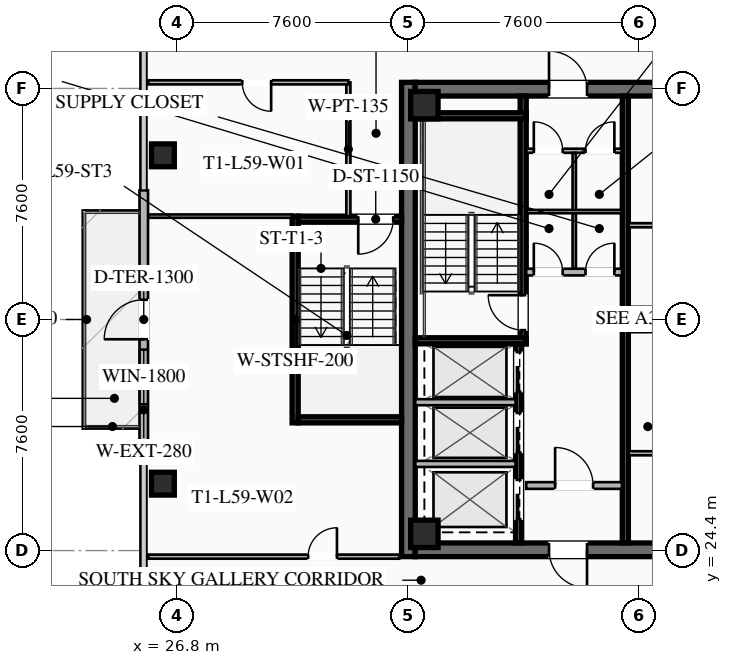
"""IFC4 building model, lengths in metres.
Left out: names, types, materials, properties, quantities, classifications, styles, units other than length and angle.
Written with IfcOpenShell. Run it as: python <this file> out.ifc"""

import sys

from ifc_helpers import new_model, si_unit, direction, frame, frame_2d, origin, origin_2d, place, context, subcontext, project, spatial, rectangle, hollow_rectangle, extrude, element, fill, save


model = new_model("IFC4")
c1 = context("Model", 3, precision=1e-05, world=origin(), true_north=direction((0.0, 1.0)))
c2 = subcontext(c1, "Body", "Model", "MODEL_VIEW")
j1 = project(units=[si_unit("LENGTHUNIT", "METRE"), si_unit("PLANEANGLEUNIT", "RADIAN")], contexts=[c1])
p1 = place(None, origin())
s1 = spatial("IfcSite", under=j1, at=p1, CompositionType="ELEMENT")
p2 = place(p1, origin())
s2 = spatial("IfcBuilding", under=s1, at=p2, CompositionType="ELEMENT")
p3 = place(p2, frame((0.0, 0.0, 218.4)))
s3 = spatial("IfcBuildingStorey", under=s2, at=p3, CompositionType="ELEMENT", Elevation=218.4)
p4 = place(p3, frame((34.425, 24.2, 0.0), z_axis=(0.0, 0.0, 1.0), x_axis=(0.0, 1.0, 0.0)))
e1 = element("IfcWall", 1, at=p4, inside=s3, PredefinedType="SHEAR", context=c2, shape_type="SweptSolid", body=[
    extrude(rectangle(XDim=15.6, YDim=0.45, at=frame_2d((7.8, 0.0))), origin(), (0.0, 0.0, 1.0), 3.55),
])
p5 = place(p3, frame((49.35, 24.425, 0.0), z_axis=(0.0, 0.0, 1.0), x_axis=(-1.0, 0.0, 0.0)))
e2 = element("IfcWall", 2, at=p5, inside=s3, PredefinedType="SHEAR", context=c2, shape_type="SweptSolid", body=[
    extrude(rectangle(XDim=14.7, YDim=0.45, at=frame_2d((7.35, 0.0))), origin(), (0.0, 0.0, 1.0), 3.55),
])
p6 = place(p5, frame((9.05, 0.0, 0.0)))
e3 = element("IfcOpeningElement", 3, at=p6, cuts=e2, PredefinedType="OPENING", context=c2, shape_type="SweptSolid", body=[
    extrude(rectangle(XDim=1.25, YDim=2.25, at=frame_2d((0.625, 1.125))), frame((0.0, 0.235, 0.0), z_axis=(0.0, -1.0, 0.0), x_axis=(1.0, 0.0, 0.0)), (0.0, 0.0, 1.0), 0.47),
])
p7 = place(p5, frame((4.0, 0.0, 0.0)))
e4 = element("IfcOpeningElement", 4, at=p7, cuts=e2, PredefinedType="OPENING", context=c2, shape_type="SweptSolid", body=[
    extrude(rectangle(XDim=1.25, YDim=2.25, at=frame_2d((0.625, 1.125))), frame((0.0, 0.235, 0.0), z_axis=(0.0, -1.0, 0.0), x_axis=(1.0, 0.0, 0.0)), (0.0, 0.0, 1.0), 0.47),
])
p8 = place(p3, frame((34.65, 39.575, 0.0), z_axis=(0.0, 0.0, 1.0), x_axis=(1.0, 0.0, 0.0)))
e5 = element("IfcWall", 5, at=p8, inside=s3, PredefinedType="SHEAR", context=c2, shape_type="SweptSolid", body=[
    extrude(rectangle(XDim=14.7, YDim=0.45, at=frame_2d((7.35, 0.0))), origin(), (0.0, 0.0, 1.0), 3.55),
])
p9 = place(p8, frame((4.4, 0.0, 0.0)))
e6 = element("IfcOpeningElement", 6, at=p9, cuts=e5, PredefinedType="OPENING", context=c2, shape_type="SweptSolid", body=[
    extrude(rectangle(XDim=1.25, YDim=2.25, at=frame_2d((0.625, 1.125))), frame((0.0, 0.235, 0.0), z_axis=(0.0, -1.0, 0.0), x_axis=(1.0, 0.0, 0.0)), (0.0, 0.0, 1.0), 0.47),
])
p10 = place(p8, frame((9.45, 0.0, 0.0)))
e7 = element("IfcOpeningElement", 7, at=p10, cuts=e5, PredefinedType="OPENING", context=c2, shape_type="SweptSolid", body=[
    extrude(rectangle(XDim=1.25, YDim=2.25, at=frame_2d((0.625, 1.125))), frame((0.0, 0.235, 0.0), z_axis=(0.0, -1.0, 0.0), x_axis=(1.0, 0.0, 0.0)), (0.0, 0.0, 1.0), 0.47),
])
for number, where, z_axis, x_axis in (
    (8, (34.95, 24.95, 0.0), (0.0, 0.0, 1.0), (1.0, 0.0, 0.0)),
    (9, (34.95, 39.05, 0.0), (0.0, 0.0, 1.0), (1.0, 0.0, 0.0)),
):
    element("IfcColumn", number, at=place(p3, frame(where, z_axis=z_axis, x_axis=x_axis)), inside=s3, PredefinedType="COLUMN", context=c2, shape_type="SweptSolid", body=[
        extrude(hollow_rectangle(XDim=0.9, YDim=0.9, WallThickness=0.04, at=origin_2d()), origin(), (0.0, 0.0, 1.0), 3.37),
    ])
for number, where, z_axis, x_axis in (
    (10, (26.35, 37.4, 0.0), (0.0, 0.0, 1.0), (1.0, 0.0, 0.0)),
    (11, (26.35, 26.6, 0.0), (0.0, 0.0, 1.0), (1.0, 0.0, 0.0)),
):
    element("IfcColumn", number, at=place(p3, frame(where, z_axis=z_axis, x_axis=x_axis)), inside=s3, PredefinedType="COLUMN", context=c2, shape_type="SweptSolid", body=[
        extrude(hollow_rectangle(XDim=0.75, YDim=0.75, WallThickness=0.032, at=origin_2d()), origin(), (0.0, 0.0, 1.0), 3.37),
    ])
p11 = place(p3, frame((25.72, 27.75, 0.0), z_axis=(0.0, 0.0, 1.0), x_axis=(0.0, 1.0, 0.0)))
e12 = element("IfcWall", 12, at=p11, inside=s3, PredefinedType="SOLIDWALL", context=c2, shape_type="SweptSolid", body=[
    extrude(rectangle(XDim=8.5, YDim=0.28, at=frame_2d((4.25, 0.0))), origin(), (0.0, 0.0, 1.0), 3.37),
])
p12 = place(p11, frame((3.6, 0.0, 0.0)))
e13 = element("IfcOpeningElement", 13, at=p12, cuts=e12, PredefinedType="OPENING", context=c2, shape_type="SweptSolid", body=[
    extrude(rectangle(XDim=1.3, YDim=2.15, at=frame_2d((0.65, 1.075))), frame((0.0, 0.15, 0.0), z_axis=(0.0, -1.0, 0.0), x_axis=(1.0, 0.0, 0.0)), (0.0, 0.0, 1.0), 0.3),
])
p13 = place(p11, frame((1.46, 0.0, 0.85)))
e14 = element("IfcOpeningElement", 14, at=p13, cuts=e12, PredefinedType="OPENING", context=c2, shape_type="SweptSolid", body=[
    extrude(rectangle(XDim=1.8, YDim=1.92, at=frame_2d((0.9, 0.96))), frame((0.0, 0.15, 0.0), z_axis=(0.0, -1.0, 0.0), x_axis=(1.0, 0.0, 0.0)), (0.0, 0.0, 1.0), 0.3),
])
p14 = place(p3, frame((38.2, 31.2, 0.0), z_axis=(0.0, 0.0, 1.0), x_axis=(0.0, 1.0, 0.0)))
e15 = element("IfcWall", 15, at=p14, inside=s3, PredefinedType="SHEAR", context=c2, shape_type="SweptSolid", body=[
    extrude(rectangle(XDim=8.15, YDim=0.2, at=frame_2d((4.075, 0.0))), origin(), (0.0, 0.0, 1.0), 3.37),
])
p15 = place(p14, frame((0.45, 0.0, 0.0)))
e16 = element("IfcOpeningElement", 16, at=p15, cuts=e15, PredefinedType="OPENING", context=c2, shape_type="SweptSolid", body=[
    extrude(rectangle(XDim=1.15, YDim=2.2, at=frame_2d((0.575, 1.1))), frame((0.0, 0.11, 0.0), z_axis=(0.0, -1.0, 0.0), x_axis=(1.0, 0.0, 0.0)), (0.0, 0.0, 1.0), 0.22),
])
for number, where, z_axis, x_axis in (
    (17, (34.65, 31.3, 0.0), (0.0, 0.0, 1.0), (1.0, 0.0, 0.0)),
    (18, (34.65, 38.7, 0.0), (0.0, 0.0, 1.0), (1.0, 0.0, 0.0)),
):
    element("IfcWall", number, at=place(p3, frame(where, z_axis=z_axis, x_axis=x_axis)), inside=s3, PredefinedType="SHEAR", context=c2, shape_type="SweptSolid", body=[
        extrude(rectangle(XDim=3.65, YDim=0.2, at=frame_2d((1.825, 0.0))), origin(), (0.0, 0.0, 1.0), 3.37),
    ])
p16 = place(p3, frame((41.56, 24.65, 0.0), z_axis=(0.0, 0.0, 1.0), x_axis=(0.0, 1.0, 0.0)))
e19 = element("IfcWall", 19, at=p16, inside=s3, PredefinedType="SHEAR", context=c2, shape_type="SweptSolid", body=[
    extrude(rectangle(XDim=14.7, YDim=0.2, at=frame_2d((7.35, 0.0))), origin(), (0.0, 0.0, 1.0), 3.37),
])
p17 = place(p3, frame((38.3, 33.56, 0.0), z_axis=(0.0, 0.0, 1.0), x_axis=(1.0, 0.0, 0.0)))
e20 = element("IfcWall", 20, at=p17, inside=s3, PredefinedType="SOLIDWALL", context=c2, shape_type="SweptSolid", body=[
    extrude(rectangle(XDim=3.15, YDim=0.22, at=frame_2d((1.575, 0.0))), origin(), (0.0, 0.0, 1.0), 2.723),
])
p18 = place(p17, frame((0.25, 0.0, 0.0)))
e21 = element("IfcOpeningElement", 21, at=p18, cuts=e20, PredefinedType="OPENING", context=c2, shape_type="SweptSolid", body=[
    extrude(rectangle(XDim=0.95, YDim=2.05, at=frame_2d((0.475, 1.025))), frame((0.0, 0.12, 0.0), z_axis=(0.0, -1.0, 0.0), x_axis=(1.0, 0.0, 0.0)), (0.0, 0.0, 1.0), 0.24),
])
p19 = place(p17, frame((1.95, 0.0, 0.0)))
e22 = element("IfcOpeningElement", 22, at=p19, cuts=e20, PredefinedType="OPENING", context=c2, shape_type="SweptSolid", body=[
    extrude(rectangle(XDim=0.95, YDim=2.05, at=frame_2d((0.475, 1.025))), frame((0.0, 0.12, 0.0), z_axis=(0.0, -1.0, 0.0), x_axis=(1.0, 0.0, 0.0)), (0.0, 0.0, 1.0), 0.24),
])
p20 = place(p3, frame((38.3, 26.54, 0.0), z_axis=(0.0, 0.0, 1.0), x_axis=(1.0, 0.0, 0.0)))
e23 = element("IfcWall", 23, at=p20, inside=s3, PredefinedType="SOLIDWALL", context=c2, shape_type="SweptSolid", body=[
    extrude(rectangle(XDim=3.15, YDim=0.22, at=frame_2d((1.575, 0.0))), origin(), (0.0, 0.0, 1.0), 2.723),
])
p21 = place(p20, frame((0.95, 0.0, 0.0)))
e24 = element("IfcOpeningElement", 24, at=p21, cuts=e23, PredefinedType="OPENING", context=c2, shape_type="SweptSolid", body=[
    extrude(rectangle(XDim=1.25, YDim=2.25, at=frame_2d((0.625, 1.125))), frame((0.0, 0.12, 0.0), z_axis=(0.0, -1.0, 0.0), x_axis=(1.0, 0.0, 0.0)), (0.0, 0.0, 1.0), 0.24),
])
p22 = place(p3, frame((38.05, 24.65, 0.0), z_axis=(0.0, 0.0, 1.0), x_axis=(0.0, 1.0, 0.0)))
e25 = element("IfcWall", 25, at=p22, inside=s3, PredefinedType="SHEAR", context=c2, shape_type="SweptSolid", body=[
    extrude(rectangle(XDim=6.55, YDim=0.2, at=frame_2d((3.275, 0.0))), origin(), (0.0, 0.0, 1.0), 3.37),
])
p23 = place(p22, frame((4.975, 0.0, 0.0)))
e26 = element("IfcOpeningElement", 26, at=p23, cuts=e25, PredefinedType="OPENING", context=c2, shape_type="SweptSolid", body=[
    extrude(rectangle(XDim=1.3, YDim=2.25, at=frame_2d((0.65, 1.125))), frame((0.0, 0.11, 0.0), z_axis=(0.0, -1.0, 0.0), x_axis=(1.0, 0.0, 0.0)), (0.0, 0.0, 1.0), 0.22),
])
p24 = place(p22, frame((2.975, 0.0, 0.0)))
e27 = element("IfcOpeningElement", 27, at=p24, cuts=e25, PredefinedType="OPENING", context=c2, shape_type="SweptSolid", body=[
    extrude(rectangle(XDim=1.3, YDim=2.25, at=frame_2d((0.65, 1.125))), frame((0.0, 0.11, 0.0), z_axis=(0.0, -1.0, 0.0), x_axis=(1.0, 0.0, 0.0)), (0.0, 0.0, 1.0), 0.22),
])
p25 = place(p22, frame((0.775, 0.0, 0.0)))
e28 = element("IfcOpeningElement", 28, at=p25, cuts=e25, PredefinedType="OPENING", context=c2, shape_type="SweptSolid", body=[
    extrude(rectangle(XDim=1.3, YDim=2.25, at=frame_2d((0.65, 1.125))), frame((0.0, 0.11, 0.0), z_axis=(0.0, -1.0, 0.0), x_axis=(1.0, 0.0, 0.0)), (0.0, 0.0, 1.0), 0.22),
])
for number, where, z_axis, x_axis in (
    (29, (34.65, 27.25, 0.0), (0.0, 0.0, 1.0), (1.0, 0.0, 0.0)),
    (30, (34.65, 29.28, 0.0), (0.0, 0.0, 1.0), (1.0, 0.0, 0.0)),
):
    element("IfcWall", number, at=place(p3, frame(where, z_axis=z_axis, x_axis=x_axis)), inside=s3, PredefinedType="SOLIDWALL", context=c2, shape_type="SweptSolid", body=[
        extrude(rectangle(XDim=3.3, YDim=0.2, at=frame_2d((1.65, 0.0))), origin(), (0.0, 0.0, 1.0), 3.37),
    ])
p26 = place(p3, frame((38.3, 37.55, 0.0), z_axis=(0.0, 0.0, 1.0), x_axis=(1.0, 0.0, 0.0)))
e31 = element("IfcWall", 31, at=p26, inside=s3, PredefinedType="PARTITIONING", context=c2, shape_type="SweptSolid", body=[
    extrude(rectangle(XDim=3.15, YDim=0.135, at=frame_2d((1.575, 0.0))), origin(), (0.0, 0.0, 1.0), 2.723),
])
p27 = place(p26, frame((0.25, 0.0, 0.0)))
e32 = element("IfcOpeningElement", 32, at=p27, cuts=e31, PredefinedType="OPENING", context=c2, shape_type="SweptSolid", body=[
    extrude(rectangle(XDim=0.95, YDim=2.05, at=frame_2d((0.475, 1.025))), frame((0.0, 0.077, 0.0), z_axis=(0.0, -1.0, 0.0), x_axis=(1.0, 0.0, 0.0)), (0.0, 0.0, 1.0), 0.155),
])
p28 = place(p26, frame((1.95, 0.0, 0.0)))
e33 = element("IfcOpeningElement", 33, at=p28, cuts=e31, PredefinedType="OPENING", context=c2, shape_type="SweptSolid", body=[
    extrude(rectangle(XDim=0.95, YDim=2.05, at=frame_2d((0.475, 1.025))), frame((0.0, 0.077, 0.0), z_axis=(0.0, -1.0, 0.0), x_axis=(1.0, 0.0, 0.0)), (0.0, 0.0, 1.0), 0.155),
])
p29 = place(p3, frame((39.88, 33.68, 0.0), z_axis=(0.0, 0.0, 1.0), x_axis=(0.0, 1.0, 0.0)))
e34 = element("IfcWall", 34, at=p29, inside=s3, PredefinedType="PARTITIONING", context=c2, shape_type="SweptSolid", body=[
    extrude(rectangle(XDim=3.8, YDim=0.11, at=frame_2d((1.9, 0.0))), origin(), (0.0, 0.0, 1.0), 2.723),
])
p30 = place(p3, frame((38.3, 35.55, 0.0), z_axis=(0.0, 0.0, 1.0), x_axis=(1.0, 0.0, 0.0)))
e35 = element("IfcWall", 35, at=p30, inside=s3, PredefinedType="PARTITIONING", context=c2, shape_type="SweptSolid", body=[
    extrude(rectangle(XDim=3.15, YDim=0.11, at=frame_2d((1.575, 0.0))), origin(), (0.0, 0.0, 1.0), 2.723),
])
for number, where, z_axis, x_axis in (
    (36, (41.67, 31.65, 0.0), (0.0, 0.0, 1.0), (1.0, 0.0, 0.0)),
    (37, (41.67, 27.6, 0.0), (0.0, 0.0, 1.0), (1.0, 0.0, 0.0)),
    (38, (41.67, 32.35, 0.0), (0.0, 0.0, 1.0), (1.0, 0.0, 0.0)),
    (39, (41.67, 35.1, 0.0), (0.0, 0.0, 1.0), (1.0, 0.0, 0.0)),
):
    element("IfcWall", number, at=place(p3, frame(where, z_axis=z_axis, x_axis=x_axis)), inside=s3, PredefinedType="PARTITIONING", context=c2, shape_type="SweptSolid", body=[
        extrude(rectangle(XDim=1.88, YDim=0.135, at=frame_2d((0.94, 0.0))), origin(), (0.0, 0.0, 1.0), 2.723),
    ])
p31 = place(p3, frame((30.7, 28.6, 0.0), z_axis=(0.0, 0.0, 1.0), x_axis=(0.0, 1.0, 0.0)))
e40 = element("IfcWall", 40, at=p31, inside=s3, PredefinedType="SHEAR", context=c2, shape_type="SweptSolid", body=[
    extrude(rectangle(XDim=6.8, YDim=0.2, at=frame_2d((3.4, 0.0))), origin(), (0.0, 0.0, 1.0), 3.37),
])
p32 = place(p3, frame((34.2, 35.3, 0.0), z_axis=(0.0, 0.0, 1.0), x_axis=(-1.0, 0.0, 0.0)))
e41 = element("IfcWall", 41, at=p32, inside=s3, PredefinedType="SHEAR", context=c2, shape_type="SweptSolid", body=[
    extrude(rectangle(XDim=3.4, YDim=0.2, at=frame_2d((1.7, 0.0))), origin(), (0.0, 0.0, 1.0), 3.37),
])
p33 = place(p32, frame((0.275, 0.0, 0.0)))
e42 = element("IfcOpeningElement", 42, at=p33, cuts=e41, PredefinedType="OPENING", context=c2, shape_type="SweptSolid", body=[
    extrude(rectangle(XDim=1.15, YDim=2.2, at=frame_2d((0.575, 1.1))), frame((0.0, 0.11, 0.0), z_axis=(0.0, -1.0, 0.0), x_axis=(1.0, 0.0, 0.0)), (0.0, 0.0, 1.0), 0.22),
])
p34 = place(p3, frame((30.8, 28.7, 0.0), z_axis=(0.0, 0.0, 1.0), x_axis=(1.0, 0.0, 0.0)))
e43 = element("IfcWall", 43, at=p34, inside=s3, PredefinedType="SHEAR", context=c2, shape_type="SweptSolid", body=[
    extrude(rectangle(XDim=3.4, YDim=0.2, at=frame_2d((1.7, 0.0))), origin(), (0.0, 0.0, 1.0), 3.37),
])
p35 = place(p3, frame((32.45, 35.4, 0.0), z_axis=(0.0, 0.0, 1.0), x_axis=(0.0, 1.0, 0.0)))
e44 = element("IfcWall", 44, at=p35, inside=s3, PredefinedType="PARTITIONING", context=c2, shape_type="SweptSolid", body=[
    extrude(rectangle(XDim=4.4, YDim=0.135, at=frame_2d((2.2, 0.0))), origin(), (0.0, 0.0, 1.0), 2.723),
])
p36 = place(p3, frame((32.45, 39.8, 0.0), z_axis=(0.0, 0.0, 1.0), x_axis=(-1.0, 0.0, 0.0)))
e45 = element("IfcWall", 45, at=p36, inside=s3, PredefinedType="PARTITIONING", context=c2, shape_type="SweptSolid", body=[
    extrude(rectangle(XDim=6.58, YDim=0.135, at=frame_2d((3.29, 0.0))), origin(), (0.0, 0.0, 1.0), 2.723),
])
p37 = place(p36, frame((2.54, 0.0, 0.0)))
e46 = element("IfcOpeningElement", 46, at=p37, cuts=e45, PredefinedType="OPENING", context=c2, shape_type="SweptSolid", body=[
    extrude(rectangle(XDim=0.95, YDim=2.05, at=frame_2d((0.475, 1.025))), frame((0.0, 0.077, 0.0), z_axis=(0.0, -1.0, 0.0), x_axis=(1.0, 0.0, 0.0)), (0.0, 0.0, 1.0), 0.155),
])
p38 = place(p3, frame((25.87, 24.2, 0.0), z_axis=(0.0, 0.0, 1.0), x_axis=(1.0, 0.0, 0.0)))
e47 = element("IfcWall", 47, at=p38, inside=s3, PredefinedType="PARTITIONING", context=c2, shape_type="SweptSolid", body=[
    extrude(rectangle(XDim=8.25, YDim=0.135, at=frame_2d((4.125, 0.0))), origin(), (0.0, 0.0, 1.0), 2.723),
])
p39 = place(p38, frame((5.255, 0.0, 0.0)))
e48 = element("IfcOpeningElement", 48, at=p39, cuts=e47, PredefinedType="OPENING", context=c2, shape_type="SweptSolid", body=[
    extrude(rectangle(XDim=0.95, YDim=2.05, at=frame_2d((0.475, 1.025))), frame((0.0, 0.077, 0.0), z_axis=(0.0, -1.0, 0.0), x_axis=(1.0, 0.0, 0.0)), (0.0, 0.0, 1.0), 0.155),
])
p40 = place(p3, frame((30.6, 35.4, 0.0), z_axis=(0.0, 0.0, 1.0), x_axis=(-1.0, 0.0, 0.0)))
e49 = element("IfcWall", 49, at=p40, inside=s3, PredefinedType="PARTITIONING", context=c2, shape_type="SweptSolid", body=[
    extrude(rectangle(XDim=4.73, YDim=0.11, at=frame_2d((2.365, 0.0))), origin(), (0.0, 0.0, 1.0), 2.723),
])
p41 = place(p12, origin())
e50 = element("IfcDoor", 50, at=p41, inside=s3, OperationType="SINGLE_SWING_LEFT", PredefinedType="DOOR", context=c2, shape_type="SweptSolid", body=[
    extrude(rectangle(XDim=1.3, YDim=2.15, at=frame_2d((0.65, 1.075))), frame((0.0, 0.025, 0.0), z_axis=(0.0, -1.0, 0.0), x_axis=(1.0, 0.0, 0.0)), (0.0, 0.0, 1.0), 0.05),
])
fill(e13, e50)
p42 = place(p13, origin())
e51 = element("IfcWindow", 51, at=p42, inside=s3, PartitioningType="SINGLE_PANEL", PredefinedType="WINDOW", context=c2, shape_type="SweptSolid", body=[
    extrude(rectangle(XDim=1.8, YDim=1.92, at=frame_2d((0.9, 0.96))), frame((0.0, 0.03, 0.0), z_axis=(0.0, -1.0, 0.0), x_axis=(1.0, 0.0, 0.0)), (0.0, 0.0, 1.0), 0.06),
])
fill(e14, e51)
p43 = place(p9, origin())
e52 = element("IfcDoor", 52, at=p43, inside=s3, OperationType="SINGLE_SWING_LEFT", PredefinedType="DOOR", context=c2, shape_type="SweptSolid", body=[
    extrude(rectangle(XDim=1.25, YDim=2.25, at=frame_2d((0.625, 1.125))), frame((0.0, 0.025, 0.0), z_axis=(0.0, -1.0, 0.0), x_axis=(1.0, 0.0, 0.0)), (0.0, 0.0, 1.0), 0.05),
])
fill(e6, e52)
p44 = place(p6, origin())
e53 = element("IfcDoor", 53, at=p44, inside=s3, OperationType="SINGLE_SWING_LEFT", PredefinedType="DOOR", context=c2, shape_type="SweptSolid", body=[
    extrude(rectangle(XDim=1.25, YDim=2.25, at=frame_2d((0.625, 1.125))), frame((0.0, 0.025, 0.0), z_axis=(0.0, -1.0, 0.0), x_axis=(1.0, 0.0, 0.0)), (0.0, 0.0, 1.0), 0.05),
])
fill(e3, e53)
p45 = place(p15, origin())
e54 = element("IfcDoor", 54, at=p45, inside=s3, OperationType="SINGLE_SWING_RIGHT", PredefinedType="DOOR", context=c2, shape_type="SweptSolid", body=[
    extrude(rectangle(XDim=1.15, YDim=2.2, at=frame_2d((0.575, 1.1))), frame((0.0, 0.025, 0.0), z_axis=(0.0, -1.0, 0.0), x_axis=(1.0, 0.0, 0.0)), (0.0, 0.0, 1.0), 0.05),
])
fill(e16, e54)
p46 = place(p21, origin())
e55 = element("IfcDoor", 55, at=p46, inside=s3, OperationType="SINGLE_SWING_LEFT", PredefinedType="DOOR", context=c2, shape_type="SweptSolid", body=[
    extrude(rectangle(XDim=1.25, YDim=2.25, at=frame_2d((0.625, 1.125))), frame((0.0, 0.025, 0.0), z_axis=(0.0, -1.0, 0.0), x_axis=(1.0, 0.0, 0.0)), (0.0, 0.0, 1.0), 0.05),
])
fill(e24, e55)
p47 = place(p27, origin())
e56 = element("IfcDoor", 56, at=p47, inside=s3, OperationType="SINGLE_SWING_LEFT", PredefinedType="DOOR", context=c2, shape_type="SweptSolid", body=[
    extrude(rectangle(XDim=0.95, YDim=2.05, at=frame_2d((0.475, 1.025))), frame((0.0, 0.025, 0.0), z_axis=(0.0, -1.0, 0.0), x_axis=(1.0, 0.0, 0.0)), (0.0, 0.0, 1.0), 0.05),
])
fill(e32, e56)
p48 = place(p28, origin())
e57 = element("IfcDoor", 57, at=p48, inside=s3, OperationType="SINGLE_SWING_RIGHT", PredefinedType="DOOR", context=c2, shape_type="SweptSolid", body=[
    extrude(rectangle(XDim=0.95, YDim=2.05, at=frame_2d((0.475, 1.025))), frame((0.0, 0.025, 0.0), z_axis=(0.0, -1.0, 0.0), x_axis=(1.0, 0.0, 0.0)), (0.0, 0.0, 1.0), 0.05),
])
fill(e33, e57)
p49 = place(p18, origin())
e58 = element("IfcDoor", 58, at=p49, inside=s3, OperationType="SINGLE_SWING_LEFT", PredefinedType="DOOR", context=c2, shape_type="SweptSolid", body=[
    extrude(rectangle(XDim=0.95, YDim=2.05, at=frame_2d((0.475, 1.025))), frame((0.0, 0.025, 0.0), z_axis=(0.0, -1.0, 0.0), x_axis=(1.0, 0.0, 0.0)), (0.0, 0.0, 1.0), 0.05),
])
fill(e21, e58)
p50 = place(p19, origin())
e59 = element("IfcDoor", 59, at=p50, inside=s3, OperationType="SINGLE_SWING_RIGHT", PredefinedType="DOOR", context=c2, shape_type="SweptSolid", body=[
    extrude(rectangle(XDim=0.95, YDim=2.05, at=frame_2d((0.475, 1.025))), frame((0.0, 0.025, 0.0), z_axis=(0.0, -1.0, 0.0), x_axis=(1.0, 0.0, 0.0)), (0.0, 0.0, 1.0), 0.05),
])
fill(e22, e59)
p51 = place(p33, origin())
e60 = element("IfcDoor", 60, at=p51, inside=s3, OperationType="SINGLE_SWING_RIGHT", PredefinedType="DOOR", context=c2, shape_type="SweptSolid", body=[
    extrude(rectangle(XDim=1.15, YDim=2.2, at=frame_2d((0.575, 1.1))), frame((0.0, 0.025, 0.0), z_axis=(0.0, -1.0, 0.0), x_axis=(1.0, 0.0, 0.0)), (0.0, 0.0, 1.0), 0.05),
])
fill(e42, e60)
p52 = place(p37, origin())
e61 = element("IfcDoor", 61, at=p52, inside=s3, OperationType="SINGLE_SWING_LEFT", PredefinedType="DOOR", context=c2, shape_type="SweptSolid", body=[
    extrude(rectangle(XDim=0.95, YDim=2.05, at=frame_2d((0.475, 1.025))), frame((0.0, 0.025, 0.0), z_axis=(0.0, -1.0, 0.0), x_axis=(1.0, 0.0, 0.0)), (0.0, 0.0, 1.0), 0.05),
])
fill(e46, e61)
p53 = place(p39, origin())
e62 = element("IfcDoor", 62, at=p53, inside=s3, OperationType="SINGLE_SWING_RIGHT", PredefinedType="DOOR", context=c2, shape_type="SweptSolid", body=[
    extrude(rectangle(XDim=0.95, YDim=2.05, at=frame_2d((0.475, 1.025))), frame((0.0, 0.025, 0.0), z_axis=(0.0, -1.0, 0.0), x_axis=(1.0, 0.0, 0.0)), (0.0, 0.0, 1.0), 0.05),
])
fill(e48, e62)
p54 = place(p23, origin())
e63 = element("IfcDoor", 63, at=p54, inside=s3, OperationType="SLIDING_TO_LEFT", PredefinedType="DOOR", context=c2, shape_type="SweptSolid", body=[
    extrude(rectangle(XDim=1.3, YDim=2.25, at=frame_2d((0.65, 1.125))), frame((0.0, 0.025, 0.0), z_axis=(0.0, -1.0, 0.0), x_axis=(1.0, 0.0, 0.0)), (0.0, 0.0, 1.0), 0.05),
])
fill(e26, e63)
p55 = place(p24, origin())
e64 = element("IfcDoor", 64, at=p55, inside=s3, OperationType="SLIDING_TO_LEFT", PredefinedType="DOOR", context=c2, shape_type="SweptSolid", body=[
    extrude(rectangle(XDim=1.3, YDim=2.25, at=frame_2d((0.65, 1.125))), frame((0.0, 0.025, 0.0), z_axis=(0.0, -1.0, 0.0), x_axis=(1.0, 0.0, 0.0)), (0.0, 0.0, 1.0), 0.05),
])
fill(e27, e64)
p56 = place(p25, origin())
e65 = element("IfcDoor", 65, at=p56, inside=s3, OperationType="SLIDING_TO_LEFT", PredefinedType="DOOR", context=c2, shape_type="SweptSolid", body=[
    extrude(rectangle(XDim=1.3, YDim=2.25, at=frame_2d((0.65, 1.125))), frame((0.0, 0.025, 0.0), z_axis=(0.0, -1.0, 0.0), x_axis=(1.0, 0.0, 0.0)), (0.0, 0.0, 1.0), 0.05),
])
fill(e28, e65)
save(model, sys.argv[1])
